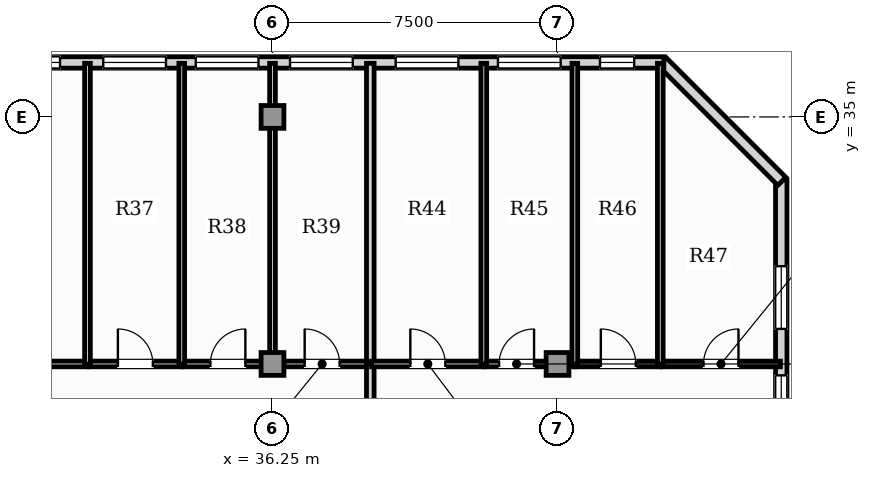
"""IFC4 building model, lengths in metres.
Left out: names, types, materials, properties, quantities, classifications, styles, units other than length and angle.
Written with IfcOpenShell. Run it as: python <this file> out.ifc"""

import sys

from ifc_helpers import new_model, si_unit, direction, frame, frame_2d, origin, origin_2d, place, context, subcontext, project, spatial, rectangle, extrude, element, fill, save


model = new_model("IFC4")
c1 = context("Model", 3, precision=1e-05, world=origin(), true_north=direction((0.0, 1.0)))
c2 = subcontext(c1, "Body", "Model", "MODEL_VIEW")
j1 = project(units=[si_unit("LENGTHUNIT", "METRE"), si_unit("PLANEANGLEUNIT", "RADIAN")], contexts=[c1])
p1 = place(None, origin())
s1 = spatial("IfcSite", under=j1, at=p1, CompositionType="ELEMENT")
p2 = place(p1, origin())
s2 = spatial("IfcBuilding", under=s1, at=p2, CompositionType="ELEMENT")
p3 = place(p2, frame((0.0, 0.0, 242.65)))
s3 = spatial("IfcBuildingStorey", under=s2, at=p3, CompositionType="ELEMENT", Elevation=242.65)
for number, where, z_axis, x_axis in (
    (1, (36.25, 28.5, 0.0), (0.0, 0.0, 1.0), (1.0, 0.0, 0.0)),
    (2, (43.75, 28.5, 0.0), (0.0, 0.0, 1.0), (1.0, 0.0, 0.0)),
    (3, (36.25, 35.0, 0.0), (0.0, 0.0, 1.0), (1.0, 0.0, 0.0)),
):
    element("IfcColumn", number, at=place(p3, frame(where, z_axis=z_axis, x_axis=x_axis)), inside=s3, PredefinedType="COLUMN", context=c2, shape_type="SweptSolid", body=[
        extrude(rectangle(XDim=0.6, YDim=0.6, at=origin_2d()), origin(), (0.0, 0.0, 1.0), 3.85),
    ])
p4 = place(p3, frame((49.637, 3.24, 0.0), z_axis=(0.0, 0.0, 1.0), x_axis=(0.0, 1.0, 0.0)))
e4 = element("IfcWall", 4, at=p4, inside=s3, PredefinedType="SOLIDWALL", context=c2, shape_type="SweptSolid", body=[
    extrude(rectangle(XDim=30.103, YDim=0.3, at=frame_2d((15.052, 0.0))), origin(), (0.0, 0.0, 1.0), 3.5),
])
p5 = place(p4, frame((24.06, 0.0, 0.95)))
e5 = element("IfcOpeningElement", 5, at=p5, cuts=e4, PredefinedType="OPENING", context=c2, shape_type="SweptSolid", body=[
    extrude(rectangle(XDim=0.9, YDim=1.5, at=frame_2d((0.45, 0.75))), frame((0.0, 0.16, 0.0), z_axis=(0.0, -1.0, 0.0), x_axis=(1.0, 0.0, 0.0)), (0.0, 0.0, 1.0), 0.32),
])
p6 = place(p4, frame((11.574, 0.0, 0.88)))
e6 = element("IfcOpeningElement", 6, at=p6, cuts=e4, PredefinedType="OPENING", context=c2, shape_type="SweptSolid", body=[
    extrude(rectangle(XDim=1.65, YDim=2.0, at=frame_2d((0.825, 1.0))), frame((0.0, 0.16, 0.0), z_axis=(0.0, -1.0, 0.0), x_axis=(1.0, 0.0, 0.0)), (0.0, 0.0, 1.0), 0.32),
])
p7 = place(p4, frame((26.182, 0.0, 0.88)))
e7 = element("IfcOpeningElement", 7, at=p7, cuts=e4, PredefinedType="OPENING", context=c2, shape_type="SweptSolid", body=[
    extrude(rectangle(XDim=1.65, YDim=2.0, at=frame_2d((0.825, 1.0))), frame((0.0, 0.16, 0.0), z_axis=(0.0, -1.0, 0.0), x_axis=(1.0, 0.0, 0.0)), (0.0, 0.0, 1.0), 0.32),
])
p8 = place(p3, frame((49.652, 33.305, 0.0), z_axis=(0.0, 0.0, 1.0), x_axis=(-0.707134240044, 0.707079321262, 0.0)))
e8 = element("IfcWall", 8, at=p8, inside=s3, PredefinedType="SOLIDWALL", context=c2, shape_type="SweptSolid", body=[
    extrude(rectangle(XDim=4.446, YDim=0.3, at=frame_2d((2.223, 0.0))), origin(), (0.0, 0.0, 1.0), 3.5),
])
p9 = place(p3, frame((46.547, 36.433, 0.0), z_axis=(0.0, 0.0, 1.0), x_axis=(-1.0, 0.0, 0.0)))
e9 = element("IfcWall", 9, at=p9, inside=s3, PredefinedType="SOLIDWALL", context=c2, shape_type="SweptSolid", body=[
    extrude(rectangle(XDim=35.593, YDim=0.3, at=frame_2d((17.797, 0.0))), origin(), (0.0, 0.0, 1.0), 3.5),
])
p10 = place(p9, frame((31.966, 0.0, 0.88)))
e10 = element("IfcOpeningElement", 10, at=p10, cuts=e9, PredefinedType="OPENING", context=c2, shape_type="SweptSolid", body=[
    extrude(rectangle(XDim=1.65, YDim=2.0, at=frame_2d((0.825, 1.0))), frame((0.0, 0.16, 0.0), z_axis=(0.0, -1.0, 0.0), x_axis=(1.0, 0.0, 0.0)), (0.0, 0.0, 1.0), 0.32),
])
p11 = place(p9, frame((26.402, 0.0, 0.88)))
e11 = element("IfcOpeningElement", 11, at=p11, cuts=e9, PredefinedType="OPENING", context=c2, shape_type="SweptSolid", body=[
    extrude(rectangle(XDim=1.65, YDim=2.0, at=frame_2d((0.825, 1.0))), frame((0.0, 0.16, 0.0), z_axis=(0.0, -1.0, 0.0), x_axis=(1.0, 0.0, 0.0)), (0.0, 0.0, 1.0), 0.32),
])
p12 = place(p9, frame((23.189, 0.0, 0.88)))
e12 = element("IfcOpeningElement", 12, at=p12, cuts=e9, PredefinedType="OPENING", context=c2, shape_type="SweptSolid", body=[
    extrude(rectangle(XDim=1.65, YDim=2.0, at=frame_2d((0.825, 1.0))), frame((0.0, 0.16, 0.0), z_axis=(0.0, -1.0, 0.0), x_axis=(1.0, 0.0, 0.0)), (0.0, 0.0, 1.0), 0.32),
])
p13 = place(p9, frame((20.703, 0.0, 0.88)))
e13 = element("IfcOpeningElement", 13, at=p13, cuts=e9, PredefinedType="OPENING", context=c2, shape_type="SweptSolid", body=[
    extrude(rectangle(XDim=1.65, YDim=2.0, at=frame_2d((0.825, 1.0))), frame((0.0, 0.16, 0.0), z_axis=(0.0, -1.0, 0.0), x_axis=(1.0, 0.0, 0.0)), (0.0, 0.0, 1.0), 0.32),
])
p14 = place(p9, frame((18.842, 0.0, 0.95)))
e14 = element("IfcOpeningElement", 14, at=p14, cuts=e9, PredefinedType="OPENING", context=c2, shape_type="SweptSolid", body=[
    extrude(rectangle(XDim=0.9, YDim=1.5, at=frame_2d((0.45, 0.75))), frame((0.0, 0.16, 0.0), z_axis=(0.0, -1.0, 0.0), x_axis=(1.0, 0.0, 0.0)), (0.0, 0.0, 1.0), 0.32),
])
p15 = place(p9, frame((15.887, 0.0, 0.88)))
e15 = element("IfcOpeningElement", 15, at=p15, cuts=e9, PredefinedType="OPENING", context=c2, shape_type="SweptSolid", body=[
    extrude(rectangle(XDim=1.65, YDim=2.0, at=frame_2d((0.825, 1.0))), frame((0.0, 0.16, 0.0), z_axis=(0.0, -1.0, 0.0), x_axis=(1.0, 0.0, 0.0)), (0.0, 0.0, 1.0), 0.32),
])
p16 = place(p9, frame((13.1, 0.0, 0.88)))
e16 = element("IfcOpeningElement", 16, at=p16, cuts=e9, PredefinedType="OPENING", context=c2, shape_type="SweptSolid", body=[
    extrude(rectangle(XDim=1.65, YDim=2.0, at=frame_2d((0.825, 1.0))), frame((0.0, 0.16, 0.0), z_axis=(0.0, -1.0, 0.0), x_axis=(1.0, 0.0, 0.0)), (0.0, 0.0, 1.0), 0.32),
])
p17 = place(p9, frame((10.666, 0.0, 0.88)))
e17 = element("IfcOpeningElement", 17, at=p17, cuts=e9, PredefinedType="OPENING", context=c2, shape_type="SweptSolid", body=[
    extrude(rectangle(XDim=1.65, YDim=2.0, at=frame_2d((0.825, 1.0))), frame((0.0, 0.16, 0.0), z_axis=(0.0, -1.0, 0.0), x_axis=(1.0, 0.0, 0.0)), (0.0, 0.0, 1.0), 0.32),
])
p18 = place(p9, frame((8.185, 0.0, 0.88)))
e18 = element("IfcOpeningElement", 18, at=p18, cuts=e9, PredefinedType="OPENING", context=c2, shape_type="SweptSolid", body=[
    extrude(rectangle(XDim=1.65, YDim=2.0, at=frame_2d((0.825, 1.0))), frame((0.0, 0.16, 0.0), z_axis=(0.0, -1.0, 0.0), x_axis=(1.0, 0.0, 0.0)), (0.0, 0.0, 1.0), 0.32),
])
p19 = place(p9, frame((5.405, 0.0, 0.88)))
e19 = element("IfcOpeningElement", 19, at=p19, cuts=e9, PredefinedType="OPENING", context=c2, shape_type="SweptSolid", body=[
    extrude(rectangle(XDim=1.65, YDim=2.0, at=frame_2d((0.825, 1.0))), frame((0.0, 0.16, 0.0), z_axis=(0.0, -1.0, 0.0), x_axis=(1.0, 0.0, 0.0)), (0.0, 0.0, 1.0), 0.32),
])
p20 = place(p9, frame((2.714, 0.0, 0.88)))
e20 = element("IfcOpeningElement", 20, at=p20, cuts=e9, PredefinedType="OPENING", context=c2, shape_type="SweptSolid", body=[
    extrude(rectangle(XDim=1.65, YDim=2.0, at=frame_2d((0.825, 1.0))), frame((0.0, 0.16, 0.0), z_axis=(0.0, -1.0, 0.0), x_axis=(1.0, 0.0, 0.0)), (0.0, 0.0, 1.0), 0.32),
])
p21 = place(p9, frame((0.78, 0.0, 0.95)))
e21 = element("IfcOpeningElement", 21, at=p21, cuts=e9, PredefinedType="OPENING", context=c2, shape_type="SweptSolid", body=[
    extrude(rectangle(XDim=0.9, YDim=1.5, at=frame_2d((0.45, 0.75))), frame((0.0, 0.16, 0.0), z_axis=(0.0, -1.0, 0.0), x_axis=(1.0, 0.0, 0.0)), (0.0, 0.0, 1.0), 0.32),
])
p22 = place(p3, frame((28.323, 28.5, 0.0), z_axis=(0.0, 0.0, 1.0), x_axis=(1.0, 0.0, 0.0)))
e22 = element("IfcWall", 22, at=p22, inside=s3, PredefinedType="PARTITIONING", context=c2, shape_type="SweptSolid", body=[
    extrude(rectangle(XDim=3.064, YDim=0.15, at=frame_2d((1.532, 0.0))), origin(), (0.0, 0.0, 1.0), 2.956),
])
p23 = place(p22, frame((1.072, 0.0, 0.0)))
e23 = element("IfcOpeningElement", 23, at=p23, cuts=e22, PredefinedType="OPENING", context=c2, shape_type="SweptSolid", body=[
    extrude(rectangle(XDim=0.92, YDim=2.1, at=frame_2d((0.46, 1.05))), frame((0.0, 0.085, 0.0), z_axis=(0.0, -1.0, 0.0), x_axis=(1.0, 0.0, 0.0)), (0.0, 0.0, 1.0), 0.17),
])
p24 = place(p3, frame((31.417, 28.5, 0.0), z_axis=(0.0, 0.0, 1.0), x_axis=(1.0, 0.0, 0.0)))
e24 = element("IfcWall", 24, at=p24, inside=s3, PredefinedType="PARTITIONING", context=c2, shape_type="SweptSolid", body=[
    extrude(rectangle(XDim=2.45, YDim=0.15, at=frame_2d((1.225, 0.0))), origin(), (0.0, 0.0, 1.0), 2.956),
])
p25 = place(p24, frame((0.765, 0.0, 0.0)))
e25 = element("IfcOpeningElement", 25, at=p25, cuts=e24, PredefinedType="OPENING", context=c2, shape_type="SweptSolid", body=[
    extrude(rectangle(XDim=0.92, YDim=2.1, at=frame_2d((0.46, 1.05))), frame((0.0, 0.085, 0.0), z_axis=(0.0, -1.0, 0.0), x_axis=(1.0, 0.0, 0.0)), (0.0, 0.0, 1.0), 0.17),
])
p26 = place(p3, frame((33.897, 28.5, 0.0), z_axis=(0.0, 0.0, 1.0), x_axis=(1.0, 0.0, 0.0)))
e26 = element("IfcWall", 26, at=p26, inside=s3, PredefinedType="PARTITIONING", context=c2, shape_type="SweptSolid", body=[
    extrude(rectangle(XDim=2.357, YDim=0.15, at=frame_2d((1.179, 0.0))), origin(), (0.0, 0.0, 1.0), 2.956),
])
p27 = place(p26, frame((0.719, 0.0, 0.0)))
e27 = element("IfcOpeningElement", 27, at=p27, cuts=e26, PredefinedType="OPENING", context=c2, shape_type="SweptSolid", body=[
    extrude(rectangle(XDim=0.92, YDim=2.1, at=frame_2d((0.46, 1.05))), frame((0.0, 0.085, 0.0), z_axis=(0.0, -1.0, 0.0), x_axis=(1.0, 0.0, 0.0)), (0.0, 0.0, 1.0), 0.17),
])
p28 = place(p3, frame((36.285, 28.5, 0.0), z_axis=(0.0, 0.0, 1.0), x_axis=(1.0, 0.0, 0.0)))
e28 = element("IfcWall", 28, at=p28, inside=s3, PredefinedType="PARTITIONING", context=c2, shape_type="SweptSolid", body=[
    extrude(rectangle(XDim=2.544, YDim=0.15, at=frame_2d((1.272, 0.0))), origin(), (0.0, 0.0, 1.0), 2.956),
])
p29 = place(p28, frame((0.812, 0.0, 0.0)))
e29 = element("IfcOpeningElement", 29, at=p29, cuts=e28, PredefinedType="OPENING", context=c2, shape_type="SweptSolid", body=[
    extrude(rectangle(XDim=0.92, YDim=2.1, at=frame_2d((0.46, 1.05))), frame((0.0, 0.085, 0.0), z_axis=(0.0, -1.0, 0.0), x_axis=(1.0, 0.0, 0.0)), (0.0, 0.0, 1.0), 0.17),
])
p30 = place(p3, frame((38.823, 26.995, 0.0), z_axis=(0.0, 0.0, 1.0), x_axis=(0.0, 1.0, 0.0)))
e30 = element("IfcWall", 30, at=p30, inside=s3, PredefinedType="PARTITIONING", context=c2, shape_type="SweptSolid", body=[
    extrude(rectangle(XDim=1.51, YDim=0.2, at=frame_2d((0.755, 0.0))), origin(), (0.0, 0.0, 1.0), 3.5),
])
for number, where, z_axis, x_axis in (
    (31, (31.382, 28.495, 0.0), (0.0, 0.0, 1.0), (0.0, 1.0, 0.0)),
    (32, (33.863, 28.495, 0.0), (0.0, 0.0, 1.0), (0.0, 1.0, 0.0)),
    (33, (36.25, 28.495, 0.0), (0.0, 0.0, 1.0), (0.0, 1.0, 0.0)),
):
    element("IfcWall", number, at=place(p3, frame(where, z_axis=z_axis, x_axis=x_axis)), inside=s3, PredefinedType="PARTITIONING", context=c2, shape_type="SweptSolid", body=[
        extrude(rectangle(XDim=7.916, YDim=0.15, at=frame_2d((3.958, 0.0))), origin(), (0.0, 0.0, 1.0), 3.5),
    ])
p31 = place(p3, frame((38.823, 28.535, 0.0), z_axis=(0.0, 0.0, 1.0), x_axis=(0.0, 1.0, 0.0)))
e34 = element("IfcWall", 34, at=p31, inside=s3, PredefinedType="PARTITIONING", context=c2, shape_type="SweptSolid", body=[
    extrude(rectangle(XDim=7.876, YDim=0.2, at=frame_2d((3.938, 0.0))), origin(), (0.0, 0.0, 1.0), 3.5),
])
p32 = place(p3, frame((38.859, 28.5, 0.0), z_axis=(0.0, 0.0, 1.0), x_axis=(1.0, 0.0, 0.0)))
e35 = element("IfcWall", 35, at=p32, inside=s3, PredefinedType="PARTITIONING", context=c2, shape_type="SweptSolid", body=[
    extrude(rectangle(XDim=2.956, YDim=0.15, at=frame_2d((1.478, 0.0))), origin(), (0.0, 0.0, 1.0), 2.956),
])
p33 = place(p32, frame((1.018, 0.0, 0.0)))
e36 = element("IfcOpeningElement", 36, at=p33, cuts=e35, PredefinedType="OPENING", context=c2, shape_type="SweptSolid", body=[
    extrude(rectangle(XDim=0.92, YDim=2.1, at=frame_2d((0.46, 1.05))), frame((0.0, 0.085, 0.0), z_axis=(0.0, -1.0, 0.0), x_axis=(1.0, 0.0, 0.0)), (0.0, 0.0, 1.0), 0.17),
])
p34 = place(p3, frame((41.845, 28.5, 0.0), z_axis=(0.0, 0.0, 1.0), x_axis=(1.0, 0.0, 0.0)))
e37 = element("IfcWall", 37, at=p34, inside=s3, PredefinedType="PARTITIONING", context=c2, shape_type="SweptSolid", body=[
    extrude(rectangle(XDim=2.366, YDim=0.15, at=frame_2d((1.183, 0.0))), origin(), (0.0, 0.0, 1.0), 2.956),
])
p35 = place(p34, frame((0.368, 0.0, 0.0)))
e38 = element("IfcOpeningElement", 38, at=p35, cuts=e37, PredefinedType="OPENING", context=c2, shape_type="SweptSolid", body=[
    extrude(rectangle(XDim=0.92, YDim=2.1, at=frame_2d((0.46, 1.05))), frame((0.0, 0.085, 0.0), z_axis=(0.0, -1.0, 0.0), x_axis=(1.0, 0.0, 0.0)), (0.0, 0.0, 1.0), 0.17),
])
p36 = place(p3, frame((44.24, 28.5, 0.0), z_axis=(0.0, 0.0, 1.0), x_axis=(1.0, 0.0, 0.0)))
e39 = element("IfcWall", 39, at=p36, inside=s3, PredefinedType="PARTITIONING", context=c2, shape_type="SweptSolid", body=[
    extrude(rectangle(XDim=2.218, YDim=0.15, at=frame_2d((1.109, 0.0))), origin(), (0.0, 0.0, 1.0), 3.5),
])
p37 = place(p36, frame((0.649, 0.0, 0.0)))
e40 = element("IfcOpeningElement", 40, at=p37, cuts=e39, PredefinedType="OPENING", context=c2, shape_type="SweptSolid", body=[
    extrude(rectangle(XDim=0.92, YDim=2.1, at=frame_2d((0.46, 1.05))), frame((0.0, 0.085, 0.0), z_axis=(0.0, -1.0, 0.0), x_axis=(1.0, 0.0, 0.0)), (0.0, 0.0, 1.0), 0.17),
])
p38 = place(p3, frame((46.489, 28.5, 0.0), z_axis=(0.0, 0.0, 1.0), x_axis=(1.0, 0.0, 0.0)))
e41 = element("IfcWall", 41, at=p38, inside=s3, PredefinedType="PARTITIONING", context=c2, shape_type="SweptSolid", body=[
    extrude(rectangle(XDim=3.126, YDim=0.15, at=frame_2d((1.563, 0.0))), origin(), (0.0, 0.0, 1.0), 3.5),
])
p39 = place(p38, frame((1.103, 0.0, 0.0)))
e42 = element("IfcOpeningElement", 42, at=p39, cuts=e41, PredefinedType="OPENING", context=c2, shape_type="SweptSolid", body=[
    extrude(rectangle(XDim=0.92, YDim=2.1, at=frame_2d((0.46, 1.05))), frame((0.0, 0.085, 0.0), z_axis=(0.0, -1.0, 0.0), x_axis=(1.0, 0.0, 0.0)), (0.0, 0.0, 1.0), 0.17),
])
for number, where, z_axis, x_axis in (
    (43, (41.81, 28.495, 0.0), (0.0, 0.0, 1.0), (0.0, 1.0, 0.0)),
    (44, (44.206, 28.495, 0.0), (0.0, 0.0, 1.0), (0.0, 1.0, 0.0)),
    (45, (46.454, 28.495, 0.0), (0.0, 0.0, 1.0), (0.0, 1.0, 0.0)),
):
    element("IfcWall", number, at=place(p3, frame(where, z_axis=z_axis, x_axis=x_axis)), inside=s3, PredefinedType="PARTITIONING", context=c2, shape_type="SweptSolid", body=[
        extrude(rectangle(XDim=7.916, YDim=0.15, at=frame_2d((3.958, 0.0))), origin(), (0.0, 0.0, 1.0), 3.5),
    ])
p40 = place(p15, origin())
e46 = element("IfcWindow", 46, at=p40, inside=s3, PartitioningType="SINGLE_PANEL", PredefinedType="WINDOW", context=c2, shape_type="SweptSolid", body=[
    extrude(rectangle(XDim=1.65, YDim=2.0, at=frame_2d((0.825, 1.0))), frame((0.0, 0.03, 0.0), z_axis=(0.0, -1.0, 0.0), x_axis=(1.0, 0.0, 0.0)), (0.0, 0.0, 1.0), 0.06),
])
fill(e15, e46)
p41 = place(p16, origin())
e47 = element("IfcWindow", 47, at=p41, inside=s3, PartitioningType="SINGLE_PANEL", PredefinedType="WINDOW", context=c2, shape_type="SweptSolid", body=[
    extrude(rectangle(XDim=1.65, YDim=2.0, at=frame_2d((0.825, 1.0))), frame((0.0, 0.03, 0.0), z_axis=(0.0, -1.0, 0.0), x_axis=(1.0, 0.0, 0.0)), (0.0, 0.0, 1.0), 0.06),
])
fill(e16, e47)
p42 = place(p17, origin())
e48 = element("IfcWindow", 48, at=p42, inside=s3, PartitioningType="SINGLE_PANEL", PredefinedType="WINDOW", context=c2, shape_type="SweptSolid", body=[
    extrude(rectangle(XDim=1.65, YDim=2.0, at=frame_2d((0.825, 1.0))), frame((0.0, 0.03, 0.0), z_axis=(0.0, -1.0, 0.0), x_axis=(1.0, 0.0, 0.0)), (0.0, 0.0, 1.0), 0.06),
])
fill(e17, e48)
p43 = place(p18, origin())
e49 = element("IfcWindow", 49, at=p43, inside=s3, PartitioningType="SINGLE_PANEL", PredefinedType="WINDOW", context=c2, shape_type="SweptSolid", body=[
    extrude(rectangle(XDim=1.65, YDim=2.0, at=frame_2d((0.825, 1.0))), frame((0.0, 0.03, 0.0), z_axis=(0.0, -1.0, 0.0), x_axis=(1.0, 0.0, 0.0)), (0.0, 0.0, 1.0), 0.06),
])
fill(e18, e49)
p44 = place(p5, origin())
e50 = element("IfcWindow", 50, at=p44, inside=s3, PartitioningType="SINGLE_PANEL", PredefinedType="WINDOW", context=c2, shape_type="SweptSolid", body=[
    extrude(rectangle(XDim=0.9, YDim=1.5, at=frame_2d((0.45, 0.75))), frame((0.0, 0.03, 0.0), z_axis=(0.0, -1.0, 0.0), x_axis=(1.0, 0.0, 0.0)), (0.0, 0.0, 1.0), 0.06),
])
fill(e5, e50)
p45 = place(p19, origin())
e51 = element("IfcWindow", 51, at=p45, inside=s3, PartitioningType="SINGLE_PANEL", PredefinedType="WINDOW", context=c2, shape_type="SweptSolid", body=[
    extrude(rectangle(XDim=1.65, YDim=2.0, at=frame_2d((0.825, 1.0))), frame((0.0, 0.03, 0.0), z_axis=(0.0, -1.0, 0.0), x_axis=(1.0, 0.0, 0.0)), (0.0, 0.0, 1.0), 0.06),
])
fill(e19, e51)
p46 = place(p20, origin())
e52 = element("IfcWindow", 52, at=p46, inside=s3, PartitioningType="SINGLE_PANEL", PredefinedType="WINDOW", context=c2, shape_type="SweptSolid", body=[
    extrude(rectangle(XDim=1.65, YDim=2.0, at=frame_2d((0.825, 1.0))), frame((0.0, 0.03, 0.0), z_axis=(0.0, -1.0, 0.0), x_axis=(1.0, 0.0, 0.0)), (0.0, 0.0, 1.0), 0.06),
])
fill(e20, e52)
p47 = place(p21, origin())
e53 = element("IfcWindow", 53, at=p47, inside=s3, PartitioningType="SINGLE_PANEL", PredefinedType="WINDOW", context=c2, shape_type="SweptSolid", body=[
    extrude(rectangle(XDim=0.9, YDim=1.5, at=frame_2d((0.45, 0.75))), frame((0.0, 0.03, 0.0), z_axis=(0.0, -1.0, 0.0), x_axis=(1.0, 0.0, 0.0)), (0.0, 0.0, 1.0), 0.06),
])
fill(e21, e53)
p48 = place(p7, origin())
e54 = element("IfcWindow", 54, at=p48, inside=s3, PartitioningType="SINGLE_PANEL", PredefinedType="WINDOW", context=c2, shape_type="SweptSolid", body=[
    extrude(rectangle(XDim=1.65, YDim=2.0, at=frame_2d((0.825, 1.0))), frame((0.0, 0.03, 0.0), z_axis=(0.0, -1.0, 0.0), x_axis=(1.0, 0.0, 0.0)), (0.0, 0.0, 1.0), 0.06),
])
fill(e7, e54)
p49 = place(p25, origin())
e55 = element("IfcDoor", 55, at=p49, inside=s3, OperationType="SINGLE_SWING_LEFT", PredefinedType="DOOR", context=c2, shape_type="SweptSolid", body=[
    extrude(rectangle(XDim=0.92, YDim=2.1, at=frame_2d((0.46, 1.05))), frame((0.0, 0.025, 0.0), z_axis=(0.0, -1.0, 0.0), x_axis=(1.0, 0.0, 0.0)), (0.0, 0.0, 1.0), 0.05),
])
fill(e25, e55)
p50 = place(p27, origin())
e56 = element("IfcDoor", 56, at=p50, inside=s3, OperationType="SINGLE_SWING_RIGHT", PredefinedType="DOOR", context=c2, shape_type="SweptSolid", body=[
    extrude(rectangle(XDim=0.92, YDim=2.1, at=frame_2d((0.46, 1.05))), frame((0.0, 0.025, 0.0), z_axis=(0.0, -1.0, 0.0), x_axis=(1.0, 0.0, 0.0)), (0.0, 0.0, 1.0), 0.05),
])
fill(e27, e56)
p51 = place(p29, origin())
e57 = element("IfcDoor", 57, at=p51, inside=s3, OperationType="SINGLE_SWING_LEFT", PredefinedType="DOOR", context=c2, shape_type="SweptSolid", body=[
    extrude(rectangle(XDim=0.92, YDim=2.1, at=frame_2d((0.46, 1.05))), frame((0.0, 0.025, 0.0), z_axis=(0.0, -1.0, 0.0), x_axis=(1.0, 0.0, 0.0)), (0.0, 0.0, 1.0), 0.05),
])
fill(e29, e57)
p52 = place(p33, origin())
e58 = element("IfcDoor", 58, at=p52, inside=s3, OperationType="SINGLE_SWING_LEFT", PredefinedType="DOOR", context=c2, shape_type="SweptSolid", body=[
    extrude(rectangle(XDim=0.92, YDim=2.1, at=frame_2d((0.46, 1.05))), frame((0.0, 0.025, 0.0), z_axis=(0.0, -1.0, 0.0), x_axis=(1.0, 0.0, 0.0)), (0.0, 0.0, 1.0), 0.05),
])
fill(e36, e58)
p53 = place(p35, origin())
e59 = element("IfcDoor", 59, at=p53, inside=s3, OperationType="SINGLE_SWING_RIGHT", PredefinedType="DOOR", context=c2, shape_type="SweptSolid", body=[
    extrude(rectangle(XDim=0.92, YDim=2.1, at=frame_2d((0.46, 1.05))), frame((0.0, 0.025, 0.0), z_axis=(0.0, -1.0, 0.0), x_axis=(1.0, 0.0, 0.0)), (0.0, 0.0, 1.0), 0.05),
])
fill(e38, e59)
p54 = place(p37, origin())
e60 = element("IfcDoor", 60, at=p54, inside=s3, OperationType="SINGLE_SWING_LEFT", PredefinedType="DOOR", context=c2, shape_type="SweptSolid", body=[
    extrude(rectangle(XDim=0.92, YDim=2.1, at=frame_2d((0.46, 1.05))), frame((0.0, 0.025, 0.0), z_axis=(0.0, -1.0, 0.0), x_axis=(1.0, 0.0, 0.0)), (0.0, 0.0, 1.0), 0.05),
])
fill(e40, e60)
p55 = place(p39, origin())
e61 = element("IfcDoor", 61, at=p55, inside=s3, OperationType="SINGLE_SWING_RIGHT", PredefinedType="DOOR", context=c2, shape_type="SweptSolid", body=[
    extrude(rectangle(XDim=0.92, YDim=2.1, at=frame_2d((0.46, 1.05))), frame((0.0, 0.025, 0.0), z_axis=(0.0, -1.0, 0.0), x_axis=(1.0, 0.0, 0.0)), (0.0, 0.0, 1.0), 0.05),
])
fill(e42, e61)
save(model, sys.argv[1])
